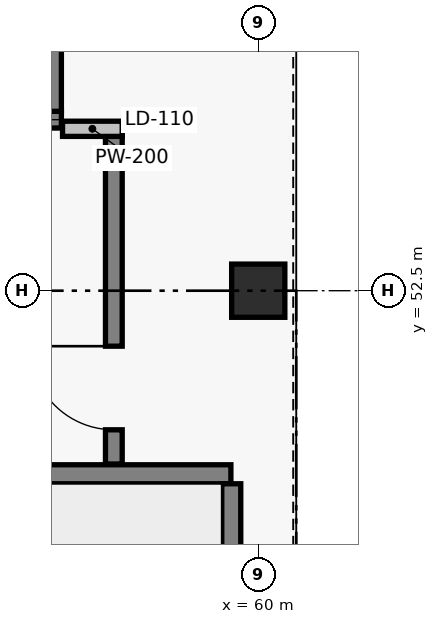
"""IFC4 building model, lengths in metres.
Left out: names, types, materials, properties, quantities, classifications, styles, units other than length and angle.
Written with IfcOpenShell. Run it as: python <this file> out.ifc"""

import sys

from ifc_helpers import new_model, si_unit, direction, frame, frame_2d, origin, origin_2d, place, context, subcontext, project, spatial, rectangle, extrude, element, fill, save


model = new_model("IFC4")
c1 = context("Model", 3, precision=1e-05, world=origin(), true_north=direction((0.0, 1.0)))
c2 = subcontext(c1, "Body", "Model", "MODEL_VIEW")
j1 = project(units=[si_unit("LENGTHUNIT", "METRE"), si_unit("PLANEANGLEUNIT", "RADIAN")], contexts=[c1])
p1 = place(None, origin())
s1 = spatial("IfcSite", under=j1, at=p1, CompositionType="ELEMENT")
p2 = place(p1, origin())
s2 = spatial("IfcBuilding", under=s1, at=p2, CompositionType="ELEMENT")
p3 = place(p2, frame((0.0, 0.0, 17.1)))
s3 = spatial("IfcBuildingStorey", under=s2, at=p3, CompositionType="ELEMENT", Elevation=17.1)
p4 = place(p3, frame((60.0, 52.5, 0.0), z_axis=(0.0, 0.0, 1.0), x_axis=(1.0, 0.0, 0.0)))
e1 = element("IfcColumn", 1, at=p4, inside=s3, PredefinedType="COLUMN", context=c2, shape_type="SweptSolid", body=[
    extrude(rectangle(XDim=0.7, YDim=0.7, at=origin_2d()), origin(), (0.0, 0.0, 1.0), 3.9),
])
p5 = place(p3, frame((52.38, 50.085, 0.0), z_axis=(0.0, 0.0, 1.0), x_axis=(1.0, 0.0, 0.0)))
e2 = element("IfcWall", 2, at=p5, inside=s3, PredefinedType="SOLIDWALL", context=c2, shape_type="SweptSolid", body=[
    extrude(rectangle(XDim=7.26, YDim=0.25, at=frame_2d((3.63, 0.0))), origin(), (0.0, 0.0, 1.0), 3.62),
])
p6 = place(p5, frame((0.62, 0.0, 0.0)))
e3 = element("IfcOpeningElement", 3, at=p6, cuts=e2, PredefinedType="OPENING", context=c2, shape_type="SweptSolid", body=[
    extrude(rectangle(XDim=1.1, YDim=2.15, at=frame_2d((0.55, 1.075))), frame((0.0, 0.135, 0.0), z_axis=(0.0, -1.0, 0.0), x_axis=(1.0, 0.0, 0.0)), (0.0, 0.0, 1.0), 0.27),
])
p7 = place(p3, frame((59.645, 46.4, 0.0), z_axis=(0.0, 0.0, 1.0), x_axis=(0.0, 1.0, 0.0)))
e4 = element("IfcWall", 4, at=p7, inside=s3, PredefinedType="SOLIDWALL", context=c2, shape_type="SweptSolid", body=[
    extrude(rectangle(XDim=3.56, YDim=0.25, at=frame_2d((1.78, 0.0))), origin(), (0.0, 0.0, 1.0), 3.62),
])
p8 = place(p3, frame((54.59, 54.75, 0.0), z_axis=(0.0, 0.0, 1.0), x_axis=(1.0, 0.0, 0.0)))
e5 = element("IfcWall", 5, at=p8, inside=s3, PredefinedType="SOLIDWALL", context=c2, shape_type="SweptSolid", body=[
    extrude(rectangle(XDim=2.82, YDim=0.22, at=frame_2d((1.41, 0.0))), origin(), (0.0, 0.0, 1.0), 3.62),
])
p9 = place(p8, frame((0.86, 0.0, 0.0)))
e6 = element("IfcOpeningElement", 6, at=p9, cuts=e5, PredefinedType="OPENING", context=c2, shape_type="SweptSolid", body=[
    extrude(rectangle(XDim=1.1, YDim=2.15, at=frame_2d((0.55, 1.075))), frame((0.0, 0.12, 0.0), z_axis=(0.0, -1.0, 0.0), x_axis=(1.0, 0.0, 0.0)), (0.0, 0.0, 1.0), 0.24),
])
p10 = place(p3, frame((57.3, 54.86, 0.0), z_axis=(0.0, 0.0, 1.0), x_axis=(0.0, 1.0, 0.0)))
e7 = element("IfcWall", 7, at=p10, inside=s3, PredefinedType="SOLIDWALL", context=c2, shape_type="SweptSolid", body=[
    extrude(rectangle(XDim=2.78, YDim=0.22, at=frame_2d((1.39, 0.0))), origin(), (0.0, 0.0, 1.0), 3.62),
])
p11 = place(p3, frame((58.1, 50.22, 0.0), z_axis=(0.0, 0.0, 1.0), x_axis=(0.0, 1.0, 0.0)))
e8 = element("IfcWall", 8, at=p11, inside=s3, PredefinedType="SOLIDWALL", context=c2, shape_type="SweptSolid", body=[
    extrude(rectangle(XDim=4.41, YDim=0.22, at=frame_2d((2.205, 0.0))), origin(), (0.0, 0.0, 1.0), 3.62),
])
p12 = place(p11, frame((0.45, 0.0, 0.0)))
e9 = element("IfcOpeningElement", 9, at=p12, cuts=e8, PredefinedType="OPENING", context=c2, shape_type="SweptSolid", body=[
    extrude(rectangle(XDim=1.1, YDim=2.15, at=frame_2d((0.55, 1.075))), frame((0.0, 0.12, 0.0), z_axis=(0.0, -1.0, 0.0), x_axis=(1.0, 0.0, 0.0)), (0.0, 0.0, 1.0), 0.24),
])
p13 = place(p3, frame((57.425, 54.63, 0.0), z_axis=(0.0, 0.0, 1.0), x_axis=(1.0, 0.0, 0.0)))
e10 = element("IfcWall", 10, at=p13, inside=s3, PredefinedType="PARTITIONING", context=c2, shape_type="SweptSolid", body=[
    extrude(rectangle(XDim=0.785, YDim=0.2, at=frame_2d((0.393, 0.0))), origin(), (0.0, 0.0, 1.0), 3.6),
])
p14 = place(p12, origin())
e11 = element("IfcDoor", 11, at=p14, inside=s3, OperationType="SINGLE_SWING_RIGHT", PredefinedType="DOOR", context=c2, shape_type="SweptSolid", body=[
    extrude(rectangle(XDim=1.1, YDim=2.15, at=frame_2d((0.55, 1.075))), frame((0.0, 0.025, 0.0), z_axis=(0.0, -1.0, 0.0), x_axis=(1.0, 0.0, 0.0)), (0.0, 0.0, 1.0), 0.05),
])
fill(e9, e11)
save(model, sys.argv[1])
